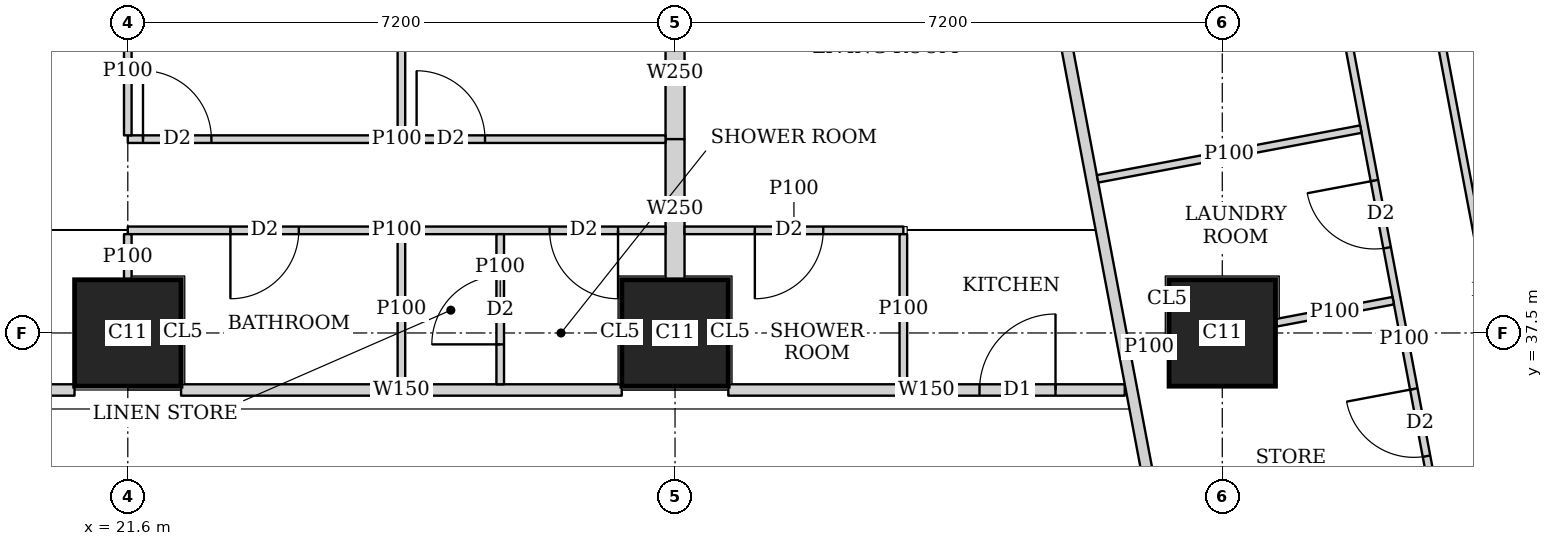
"""IFC4 building model, lengths in metres.
Left out: names, types, materials, properties, quantities, classifications, styles, units other than length and angle.
Written with IfcOpenShell. Run it as: python <this file> out.ifc"""

import sys

from ifc_helpers import new_model, si_unit, direction, frame, frame_2d, origin, origin_2d, place, context, subcontext, project, spatial, rectangle, extrude, element, fill, save


model = new_model("IFC4")
c1 = context("Model", 3, precision=1e-05, world=origin(), true_north=direction((0.0, 1.0)))
c2 = subcontext(c1, "Body", "Model", "MODEL_VIEW")
j1 = project(units=[si_unit("LENGTHUNIT", "METRE"), si_unit("PLANEANGLEUNIT", "RADIAN")], contexts=[c1])
p1 = place(None, origin())
s1 = spatial("IfcSite", under=j1, at=p1, CompositionType="ELEMENT")
p2 = place(p1, origin())
s2 = spatial("IfcBuilding", under=s1, at=p2, CompositionType="ELEMENT")
p3 = place(p2, frame((0.0, 0.0, 277.85)))
s3 = spatial("IfcBuildingStorey", under=s2, at=p3, CompositionType="ELEMENT", Elevation=277.85)
for number, where, z_axis, x_axis in (
    (1, (21.6, 37.5, 0.0), (0.0, 0.0, 1.0), (1.0, 0.0, 0.0)),
    (2, (28.8, 37.5, 0.0), (0.0, 0.0, 1.0), (1.0, 0.0, 0.0)),
    (3, (36.0, 37.5, 0.0), (0.0, 0.0, 1.0), (1.0, 0.0, 0.0)),
):
    element("IfcColumn", number, at=place(p3, frame(where, z_axis=z_axis, x_axis=x_axis)), inside=s3, PredefinedType="COLUMN", context=c2, shape_type="SweptSolid", body=[
        extrude(rectangle(XDim=1.4, YDim=1.4, at=origin_2d()), origin(), (0.0, 0.0, 1.0), 3.75),
    ])
p4 = place(p3, frame((16.001, 36.75, 0.0), z_axis=(0.0, 0.0, 1.0), x_axis=(1.0, 0.0, 0.0)))
e4 = element("IfcWall", 4, at=p4, inside=s3, PredefinedType="SOLIDWALL", context=c2, shape_type="SweptSolid", body=[
    extrude(rectangle(XDim=4.898, YDim=0.15, at=frame_2d((2.449, 0.0))), origin(), (0.0, 0.0, 1.0), 3.5),
])
p5 = place(p4, frame((1.074, 0.0, 0.0)))
e5 = element("IfcOpeningElement", 5, at=p5, cuts=e4, PredefinedType="OPENING", context=c2, shape_type="SweptSolid", body=[
    extrude(rectangle(XDim=1.0, YDim=2.1, at=frame_2d((0.5, 1.05))), frame((0.0, 0.085, 0.0), z_axis=(0.0, -1.0, 0.0), x_axis=(1.0, 0.0, 0.0)), (0.0, 0.0, 1.0), 0.17),
])
p6 = place(p3, frame((22.301, 36.75, 0.0), z_axis=(0.0, 0.0, 1.0), x_axis=(1.0, 0.0, 0.0)))
e6 = element("IfcWall", 6, at=p6, inside=s3, PredefinedType="SOLIDWALL", context=c2, shape_type="SweptSolid", body=[
    extrude(rectangle(XDim=5.798, YDim=0.15, at=frame_2d((2.899, 0.0))), origin(), (0.0, 0.0, 1.0), 3.5),
])
p7 = place(p3, frame((29.501, 36.75, 0.0), z_axis=(0.0, 0.0, 1.0), x_axis=(1.0, 0.0, 0.0)))
e7 = element("IfcWall", 7, at=p7, inside=s3, PredefinedType="SOLIDWALL", context=c2, shape_type="SweptSolid", body=[
    extrude(rectangle(XDim=5.216, YDim=0.15, at=frame_2d((2.608, 0.0))), origin(), (0.0, 0.0, 1.0), 3.5),
])
p8 = place(p7, frame((3.305, 0.0, 0.0)))
e8 = element("IfcOpeningElement", 8, at=p8, cuts=e7, PredefinedType="OPENING", context=c2, shape_type="SweptSolid", body=[
    extrude(rectangle(XDim=1.0, YDim=2.1, at=frame_2d((0.5, 1.05))), frame((0.0, 0.085, 0.0), z_axis=(0.0, -1.0, 0.0), x_axis=(1.0, 0.0, 0.0)), (0.0, 0.0, 1.0), 0.17),
])
p9 = place(p3, frame((33.781, 42.186, 0.0), z_axis=(0.0, 0.0, 1.0), x_axis=(0.185593518645, -0.9826266055, 0.0)))
e9 = element("IfcWall", 9, at=p9, inside=s3, PredefinedType="SOLIDWALL", context=c2, shape_type="SweptSolid", body=[
    extrude(rectangle(XDim=35.961, YDim=0.15, at=frame_2d((17.98, 0.0))), origin(), (0.0, 0.0, 1.0), 2.5),
])
p10 = place(p9, frame((11.76, 0.0, 0.0)))
e10 = element("IfcOpeningElement", 10, at=p10, cuts=e9, PredefinedType="OPENING", context=c2, shape_type="SweptSolid", body=[
    extrude(rectangle(XDim=1.0, YDim=2.1, at=frame_2d((0.5, 1.05))), frame((0.0, 0.085, 0.0), z_axis=(0.0, -1.0, 0.0), x_axis=(1.0, 0.0, 0.0)), (0.0, 0.0, 1.0), 0.17),
])
p11 = place(p9, frame((15.576, 0.0, 0.0)))
e11 = element("IfcOpeningElement", 11, at=p11, cuts=e9, PredefinedType="OPENING", context=c2, shape_type="SweptSolid", body=[
    extrude(rectangle(XDim=1.0, YDim=2.1, at=frame_2d((0.5, 1.05))), frame((0.0, 0.085, 0.0), z_axis=(0.0, -1.0, 0.0), x_axis=(1.0, 0.0, 0.0)), (0.0, 0.0, 1.0), 0.17),
])
p12 = place(p9, frame((30.502, 0.0, 0.0)))
e12 = element("IfcOpeningElement", 12, at=p12, cuts=e9, PredefinedType="OPENING", context=c2, shape_type="SweptSolid", body=[
    extrude(rectangle(XDim=1.0, YDim=2.1, at=frame_2d((0.5, 1.05))), frame((0.0, 0.085, 0.0), z_axis=(0.0, -1.0, 0.0), x_axis=(1.0, 0.0, 0.0)), (0.0, 0.0, 1.0), 0.17),
])
p13 = place(p3, frame((38.744, 42.045, 0.0), z_axis=(0.0, 0.0, 1.0), x_axis=(0.185588352162, -0.982627581305, 0.0)))
e13 = element("IfcWall", 13, at=p13, inside=s3, PredefinedType="PARTITIONING", context=c2, shape_type="SweptSolid", body=[
    extrude(rectangle(XDim=9.241, YDim=0.1, at=frame_2d((4.621, 0.0))), origin(), (0.0, 0.0, 1.0), 3.5),
])
p14 = place(p13, frame((8.191, 0.0, 0.0)))
e14 = element("IfcOpeningElement", 14, at=p14, cuts=e13, PredefinedType="OPENING", context=c2, shape_type="SweptSolid", body=[
    extrude(rectangle(XDim=0.9, YDim=2.1, at=frame_2d((0.45, 1.05))), frame((0.0, 0.06, 0.0), z_axis=(0.0, -1.0, 0.0), x_axis=(1.0, 0.0, 0.0)), (0.0, 0.0, 1.0), 0.12),
])
p15 = place(p13, frame((4.215, 0.0, 0.0)))
e15 = element("IfcOpeningElement", 15, at=p15, cuts=e13, PredefinedType="OPENING", context=c2, shape_type="SweptSolid", body=[
    extrude(rectangle(XDim=0.9, YDim=2.1, at=frame_2d((0.45, 1.05))), frame((0.0, 0.06, 0.0), z_axis=(0.0, -1.0, 0.0), x_axis=(1.0, 0.0, 0.0)), (0.0, 0.0, 1.0), 0.12),
])
p16 = place(p3, frame((37.51, 42.109, 0.0), z_axis=(0.0, 0.0, 1.0), x_axis=(0.185659798122, -0.982614084654, 0.0)))
e16 = element("IfcWall", 16, at=p16, inside=s3, PredefinedType="PARTITIONING", context=c2, shape_type="SweptSolid", body=[
    extrude(rectangle(XDim=9.534, YDim=0.1, at=frame_2d((4.767, 0.0))), origin(), (0.0, 0.0, 1.0), 3.5),
])
p17 = place(p16, frame((8.109, 0.0, 0.0)))
e17 = element("IfcOpeningElement", 17, at=p17, cuts=e16, PredefinedType="OPENING", context=c2, shape_type="SweptSolid", body=[
    extrude(rectangle(XDim=0.9, YDim=2.1, at=frame_2d((0.45, 1.05))), frame((0.0, 0.06, 0.0), z_axis=(0.0, -1.0, 0.0), x_axis=(1.0, 0.0, 0.0)), (0.0, 0.0, 1.0), 0.12),
])
p18 = place(p16, frame((2.65, 0.0, 0.0)))
e18 = element("IfcOpeningElement", 18, at=p18, cuts=e16, PredefinedType="OPENING", context=c2, shape_type="SweptSolid", body=[
    extrude(rectangle(XDim=0.9, YDim=2.1, at=frame_2d((0.45, 1.05))), frame((0.0, 0.06, 0.0), z_axis=(0.0, -1.0, 0.0), x_axis=(1.0, 0.0, 0.0)), (0.0, 0.0, 1.0), 0.12),
])
p19 = place(p16, frame((5.44, 0.0, 0.0)))
e19 = element("IfcOpeningElement", 19, at=p19, cuts=e16, PredefinedType="OPENING", context=c2, shape_type="SweptSolid", body=[
    extrude(rectangle(XDim=0.9, YDim=2.1, at=frame_2d((0.45, 1.05))), frame((0.0, 0.06, 0.0), z_axis=(0.0, -1.0, 0.0), x_axis=(1.0, 0.0, 0.0)), (0.0, 0.0, 1.0), 0.12),
])
p20 = place(p3, frame((37.823, 40.182, 0.0), z_axis=(0.0, 0.0, 1.0), x_axis=(-0.98263926043, -0.185526504472, 0.0)))
e20 = element("IfcWall", 20, at=p20, inside=s3, PredefinedType="PARTITIONING", context=c2, shape_type="SweptSolid", body=[
    extrude(rectangle(XDim=3.524, YDim=0.1, at=frame_2d((1.762, 0.0))), origin(), (0.0, 0.0, 1.0), 3.5),
])
p21 = place(p3, frame((38.25, 37.925, 0.0), z_axis=(0.0, 0.0, 1.0), x_axis=(-0.982610209589, -0.185680305934, 0.0)))
e21 = element("IfcWall", 21, at=p21, inside=s3, PredefinedType="PARTITIONING", context=c2, shape_type="SweptSolid", body=[
    extrude(rectangle(XDim=1.567, YDim=0.1, at=frame_2d((0.784, 0.0))), origin(), (0.0, 0.0, 1.0), 3.5),
])
p22 = place(p3, frame((35.29, 37.366, 0.0), z_axis=(0.0, 0.0, 1.0), x_axis=(-0.982715597703, -0.185121727606, 0.0)))
e22 = element("IfcWall", 22, at=p22, inside=s3, PredefinedType="PARTITIONING", context=c2, shape_type="SweptSolid", body=[
    extrude(rectangle(XDim=0.513, YDim=0.1, at=frame_2d((0.256, 0.0))), origin(), (0.0, 0.0, 1.0), 3.5),
])
p23 = place(p3, frame((21.6, 40.05, 0.0), z_axis=(0.0, 0.0, 1.0), x_axis=(1.0, 0.0, 0.0)))
e23 = element("IfcWall", 23, at=p23, inside=s3, PredefinedType="PARTITIONING", context=c2, shape_type="SweptSolid", body=[
    extrude(rectangle(XDim=7.075, YDim=0.1, at=frame_2d((3.538, 0.0))), origin(), (0.0, 0.0, 1.0), 3.5),
])
p24 = place(p23, frame((0.2, 0.0, 0.0)))
e24 = element("IfcOpeningElement", 24, at=p24, cuts=e23, PredefinedType="OPENING", context=c2, shape_type="SweptSolid", body=[
    extrude(rectangle(XDim=0.9, YDim=2.1, at=frame_2d((0.45, 1.05))), frame((0.0, 0.06, 0.0), z_axis=(0.0, -1.0, 0.0), x_axis=(1.0, 0.0, 0.0)), (0.0, 0.0, 1.0), 0.12),
])
p25 = place(p23, frame((3.8, 0.0, 0.0)))
e25 = element("IfcOpeningElement", 25, at=p25, cuts=e23, PredefinedType="OPENING", context=c2, shape_type="SweptSolid", body=[
    extrude(rectangle(XDim=0.9, YDim=2.1, at=frame_2d((0.45, 1.05))), frame((0.0, 0.06, 0.0), z_axis=(0.0, -1.0, 0.0), x_axis=(1.0, 0.0, 0.0)), (0.0, 0.0, 1.0), 0.12),
])
p26 = place(p3, frame((21.6, 38.85, 0.0), z_axis=(0.0, 0.0, 1.0), x_axis=(1.0, 0.0, 0.0)))
e26 = element("IfcWall", 26, at=p26, inside=s3, PredefinedType="PARTITIONING", context=c2, shape_type="SweptSolid", body=[
    extrude(rectangle(XDim=7.075, YDim=0.1, at=frame_2d((3.538, 0.0))), origin(), (0.0, 0.0, 1.0), 3.5),
])
p27 = place(p26, frame((1.35, 0.0, 0.0)))
e27 = element("IfcOpeningElement", 27, at=p27, cuts=e26, PredefinedType="OPENING", context=c2, shape_type="SweptSolid", body=[
    extrude(rectangle(XDim=0.9, YDim=2.1, at=frame_2d((0.45, 1.05))), frame((0.0, 0.06, 0.0), z_axis=(0.0, -1.0, 0.0), x_axis=(1.0, 0.0, 0.0)), (0.0, 0.0, 1.0), 0.12),
])
p28 = place(p26, frame((5.55, 0.0, 0.0)))
e28 = element("IfcOpeningElement", 28, at=p28, cuts=e26, PredefinedType="OPENING", context=c2, shape_type="SweptSolid", body=[
    extrude(rectangle(XDim=0.9, YDim=2.1, at=frame_2d((0.45, 1.05))), frame((0.0, 0.06, 0.0), z_axis=(0.0, -1.0, 0.0), x_axis=(1.0, 0.0, 0.0)), (0.0, 0.0, 1.0), 0.12),
])
p29 = place(p3, frame((21.6, 40.1, 0.0), z_axis=(0.0, 0.0, 1.0), x_axis=(0.0, 1.0, 0.0)))
e29 = element("IfcWall", 29, at=p29, inside=s3, PredefinedType="PARTITIONING", context=c2, shape_type="SweptSolid", body=[
    extrude(rectangle(XDim=1.699, YDim=0.1, at=frame_2d((0.85, 0.0))), origin(), (0.0, 0.0, 1.0), 3.5),
])
p30 = place(p3, frame((25.2, 40.1, 0.0), z_axis=(0.0, 0.0, 1.0), x_axis=(0.0, 1.0, 0.0)))
e30 = element("IfcWall", 30, at=p30, inside=s3, PredefinedType="PARTITIONING", context=c2, shape_type="SweptSolid", body=[
    extrude(rectangle(XDim=3.75, YDim=0.1, at=frame_2d((1.875, 0.0))), origin(), (0.0, 0.0, 1.0), 2.05),
])
p31 = place(p3, frame((21.6, 38.201, 0.0), z_axis=(0.0, 0.0, 1.0), x_axis=(0.0, 1.0, 0.0)))
e31 = element("IfcWall", 31, at=p31, inside=s3, PredefinedType="PARTITIONING", context=c2, shape_type="SweptSolid", body=[
    extrude(rectangle(XDim=0.599, YDim=0.1, at=frame_2d((0.3, 0.0))), origin(), (0.0, 0.0, 1.0), 3.5),
])
p32 = place(p3, frame((25.2, 36.825, 0.0), z_axis=(0.0, 0.0, 1.0), x_axis=(0.0, 1.0, 0.0)))
e32 = element("IfcWall", 32, at=p32, inside=s3, PredefinedType="PARTITIONING", context=c2, shape_type="SweptSolid", body=[
    extrude(rectangle(XDim=1.975, YDim=0.1, at=frame_2d((0.988, 0.0))), origin(), (0.0, 0.0, 1.0), 3.5),
])
p33 = place(p3, frame((26.5, 36.825, 0.0), z_axis=(0.0, 0.0, 1.0), x_axis=(0.0, 1.0, 0.0)))
e33 = element("IfcWall", 33, at=p33, inside=s3, PredefinedType="PARTITIONING", context=c2, shape_type="SweptSolid", body=[
    extrude(rectangle(XDim=1.975, YDim=0.1, at=frame_2d((0.988, 0.0))), origin(), (0.0, 0.0, 1.0), 3.5),
])
p34 = place(p33, frame((0.525, 0.0, 0.0)))
e34 = element("IfcOpeningElement", 34, at=p34, cuts=e33, PredefinedType="OPENING", context=c2, shape_type="SweptSolid", body=[
    extrude(rectangle(XDim=0.9, YDim=2.1, at=frame_2d((0.45, 1.05))), frame((0.0, 0.06, 0.0), z_axis=(0.0, -1.0, 0.0), x_axis=(1.0, 0.0, 0.0)), (0.0, 0.0, 1.0), 0.12),
])
p35 = place(p3, frame((28.925, 38.85, 0.0), z_axis=(0.0, 0.0, 1.0), x_axis=(1.0, 0.0, 0.0)))
e35 = element("IfcWall", 35, at=p35, inside=s3, PredefinedType="PARTITIONING", context=c2, shape_type="SweptSolid", body=[
    extrude(rectangle(XDim=2.879, YDim=0.1, at=frame_2d((1.439, 0.0))), origin(), (0.0, 0.0, 1.0), 3.5),
])
p36 = place(p35, frame((0.925, 0.0, 0.0)))
e36 = element("IfcOpeningElement", 36, at=p36, cuts=e35, PredefinedType="OPENING", context=c2, shape_type="SweptSolid", body=[
    extrude(rectangle(XDim=0.9, YDim=2.1, at=frame_2d((0.45, 1.05))), frame((0.0, 0.06, 0.0), z_axis=(0.0, -1.0, 0.0), x_axis=(1.0, 0.0, 0.0)), (0.0, 0.0, 1.0), 0.12),
])
p37 = place(p3, frame((31.804, 36.825, 0.0), z_axis=(0.0, 0.0, 1.0), x_axis=(0.0, 1.0, 0.0)))
e37 = element("IfcWall", 37, at=p37, inside=s3, PredefinedType="PARTITIONING", context=c2, shape_type="SweptSolid", body=[
    extrude(rectangle(XDim=1.975, YDim=0.1, at=frame_2d((0.988, 0.0))), origin(), (0.0, 0.0, 1.0), 3.5),
])
p38 = place(p3, frame((28.8, 40.05, 0.0), z_axis=(0.0, 0.0, 1.0), x_axis=(0.0, 1.0, 0.0)))
e38 = element("IfcWall", 38, at=p38, inside=s3, PredefinedType="SOLIDWALL", context=c2, shape_type="SweptSolid", body=[
    extrude(rectangle(XDim=1.749, YDim=0.25, at=frame_2d((0.875, 0.0))), origin(), (0.0, 0.0, 1.0), 3.5),
])
p39 = place(p3, frame((28.8, 38.201, 0.0), z_axis=(0.0, 0.0, 1.0), x_axis=(0.0, 1.0, 0.0)))
e39 = element("IfcWall", 39, at=p39, inside=s3, PredefinedType="SOLIDWALL", context=c2, shape_type="SweptSolid", body=[
    extrude(rectangle(XDim=1.849, YDim=0.25, at=frame_2d((0.925, 0.0))), origin(), (0.0, 0.0, 1.0), 3.5),
])
p40 = place(p18, origin())
e40 = element("IfcDoor", 40, at=p40, inside=s3, OperationType="SINGLE_SWING_RIGHT", PredefinedType="DOOR", context=c2, shape_type="SweptSolid", body=[
    extrude(rectangle(XDim=0.9, YDim=2.1, at=frame_2d((0.45, 1.05))), frame((0.0, 0.025, 0.0), z_axis=(0.0, -1.0, 0.0), x_axis=(1.0, 0.0, 0.0)), (0.0, 0.0, 1.0), 0.05),
])
fill(e18, e40)
p41 = place(p19, origin())
e41 = element("IfcDoor", 41, at=p41, inside=s3, OperationType="SINGLE_SWING_RIGHT", PredefinedType="DOOR", context=c2, shape_type="SweptSolid", body=[
    extrude(rectangle(XDim=0.9, YDim=2.1, at=frame_2d((0.45, 1.05))), frame((0.0, 0.025, 0.0), z_axis=(0.0, -1.0, 0.0), x_axis=(1.0, 0.0, 0.0)), (0.0, 0.0, 1.0), 0.05),
])
fill(e19, e41)
p42 = place(p24, origin())
e42 = element("IfcDoor", 42, at=p42, inside=s3, OperationType="SINGLE_SWING_LEFT", PredefinedType="DOOR", context=c2, shape_type="SweptSolid", body=[
    extrude(rectangle(XDim=0.9, YDim=2.1, at=frame_2d((0.45, 1.05))), frame((0.0, 0.025, 0.0), z_axis=(0.0, -1.0, 0.0), x_axis=(1.0, 0.0, 0.0)), (0.0, 0.0, 1.0), 0.05),
])
fill(e24, e42)
p43 = place(p25, origin())
e43 = element("IfcDoor", 43, at=p43, inside=s3, OperationType="SINGLE_SWING_LEFT", PredefinedType="DOOR", context=c2, shape_type="SweptSolid", body=[
    extrude(rectangle(XDim=0.9, YDim=2.1, at=frame_2d((0.45, 1.05))), frame((0.0, 0.025, 0.0), z_axis=(0.0, -1.0, 0.0), x_axis=(1.0, 0.0, 0.0)), (0.0, 0.0, 1.0), 0.05),
])
fill(e25, e43)
p44 = place(p27, origin())
e44 = element("IfcDoor", 44, at=p44, inside=s3, OperationType="SINGLE_SWING_RIGHT", PredefinedType="DOOR", context=c2, shape_type="SweptSolid", body=[
    extrude(rectangle(XDim=0.9, YDim=2.1, at=frame_2d((0.45, 1.05))), frame((0.0, 0.025, 0.0), z_axis=(0.0, -1.0, 0.0), x_axis=(1.0, 0.0, 0.0)), (0.0, 0.0, 1.0), 0.05),
])
fill(e27, e44)
p45 = place(p28, origin())
e45 = element("IfcDoor", 45, at=p45, inside=s3, OperationType="SINGLE_SWING_LEFT", PredefinedType="DOOR", context=c2, shape_type="SweptSolid", body=[
    extrude(rectangle(XDim=0.9, YDim=2.1, at=frame_2d((0.45, 1.05))), frame((0.0, 0.025, 0.0), z_axis=(0.0, -1.0, 0.0), x_axis=(1.0, 0.0, 0.0)), (0.0, 0.0, 1.0), 0.05),
])
fill(e28, e45)
p46 = place(p34, origin())
e46 = element("IfcDoor", 46, at=p46, inside=s3, OperationType="SINGLE_SWING_LEFT", PredefinedType="DOOR", context=c2, shape_type="SweptSolid", body=[
    extrude(rectangle(XDim=0.9, YDim=2.1, at=frame_2d((0.45, 1.05))), frame((0.0, 0.025, 0.0), z_axis=(0.0, -1.0, 0.0), x_axis=(1.0, 0.0, 0.0)), (0.0, 0.0, 1.0), 0.05),
])
fill(e34, e46)
p47 = place(p36, origin())
e47 = element("IfcDoor", 47, at=p47, inside=s3, OperationType="SINGLE_SWING_RIGHT", PredefinedType="DOOR", context=c2, shape_type="SweptSolid", body=[
    extrude(rectangle(XDim=0.9, YDim=2.1, at=frame_2d((0.45, 1.05))), frame((0.0, 0.025, 0.0), z_axis=(0.0, -1.0, 0.0), x_axis=(1.0, 0.0, 0.0)), (0.0, 0.0, 1.0), 0.05),
])
fill(e36, e47)
p48 = place(p8, origin())
e48 = element("IfcDoor", 48, at=p48, inside=s3, OperationType="SINGLE_SWING_RIGHT", PredefinedType="DOOR", context=c2, shape_type="SweptSolid", body=[
    extrude(rectangle(XDim=1.0, YDim=2.1, at=frame_2d((0.5, 1.05))), frame((0.0, 0.025, 0.0), z_axis=(0.0, -1.0, 0.0), x_axis=(1.0, 0.0, 0.0)), (0.0, 0.0, 1.0), 0.05),
])
fill(e8, e48)
save(model, sys.argv[1])
